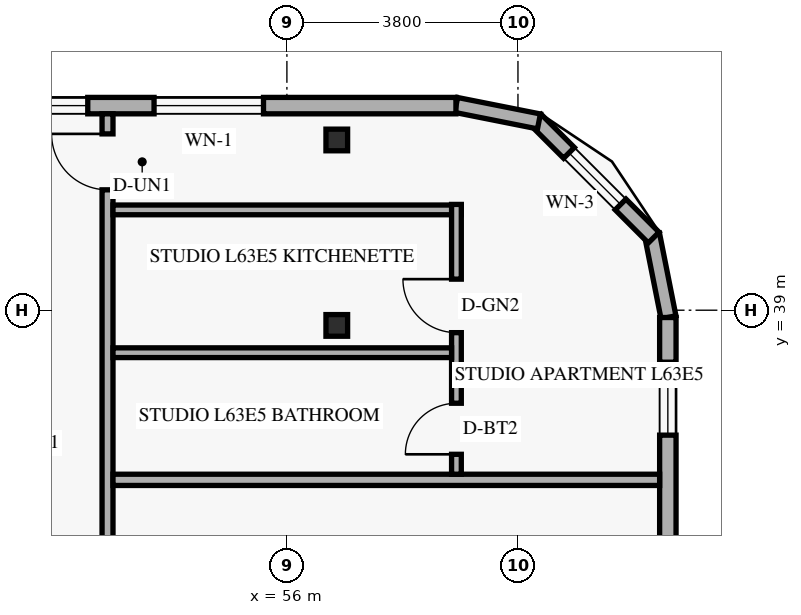
"""IFC4 building model, lengths in metres.
Left out: names, types, materials, properties, quantities, classifications, styles, units other than length and angle.
Written with IfcOpenShell. Run it as: python <this file> out.ifc"""

import sys

from ifc_helpers import new_model, si_unit, direction, frame, frame_2d, origin, origin_2d, place, context, subcontext, project, spatial, rectangle, hollow_rectangle, extrude, element, fill, save


model = new_model("IFC4")
c1 = context("Model", 3, precision=1e-05, world=origin(), true_north=direction((0.0, 1.0)))
c2 = subcontext(c1, "Body", "Model", "MODEL_VIEW")
j1 = project(units=[si_unit("LENGTHUNIT", "METRE"), si_unit("PLANEANGLEUNIT", "RADIAN")], contexts=[c1])
p1 = place(None, origin())
s1 = spatial("IfcSite", under=j1, at=p1, CompositionType="ELEMENT")
p2 = place(p1, origin())
s2 = spatial("IfcBuilding", under=s1, at=p2, CompositionType="ELEMENT")
p3 = place(p2, frame((0.0, 0.0, 242.4)))
s3 = spatial("IfcBuildingStorey", under=s2, at=p3, CompositionType="ELEMENT", Elevation=242.4)
for number, where, z_axis, x_axis in (
    (1, (56.716, 38.75, 0.0), (0.058, 0.0, 0.998), (0.0, 1.0, 0.0)),
    (2, (56.716, 41.8, 0.0), (0.058, 0.0, 0.998), (0.0, 1.0, 0.0)),
):
    element("IfcColumn", number, at=place(p3, frame(where, z_axis=z_axis, x_axis=x_axis)), inside=s3, PredefinedType="COLUMN", context=c2, shape_type="SweptSolid", body=[
        extrude(hollow_rectangle(XDim=0.356, YDim=0.356, WallThickness=0.016, at=origin_2d()), origin(), (0.0, 0.0, 1.0), 3.606),
    ])
p4 = place(p3, frame((62.276, 38.884, 0.0), z_axis=(0.0, 0.0, 1.0), x_axis=(-0.195135625965, 0.9807762678, 0.0)))
e3 = element("IfcWall", 3, at=p4, inside=s3, PredefinedType="SOLIDWALL", context=c2, shape_type="SweptSolid", body=[
    extrude(rectangle(XDim=1.389, YDim=0.25, at=frame_2d((0.694, 0.0))), origin(), (0.0, 0.0, 1.0), 3.36),
])
p5 = place(p3, frame((62.032, 40.195, 0.0), z_axis=(0.0, 0.0, 1.0), x_axis=(-0.707106781187, 0.707106781187, 0.0)))
e4 = element("IfcWall", 4, at=p5, inside=s3, PredefinedType="SOLIDWALL", context=c2, shape_type="SweptSolid", body=[
    extrude(rectangle(XDim=2.739, YDim=0.25, at=frame_2d((1.37, 0.0))), origin(), (0.0, 0.0, 1.0), 3.36),
])
p6 = place(p5, frame((0.77, 0.0, 0.85)))
e5 = element("IfcOpeningElement", 5, at=p6, cuts=e4, PredefinedType="OPENING", context=c2, shape_type="SweptSolid", body=[
    extrude(rectangle(XDim=1.2, YDim=1.5, at=frame_2d((0.6, 0.75))), frame((0.0, 0.135, 0.0), z_axis=(0.0, -1.0, 0.0), x_axis=(1.0, 0.0, 0.0)), (0.0, 0.0, 1.0), 0.27),
])
p7 = place(p3, frame((60.146, 42.105, 0.0), z_axis=(0.0, 0.0, 1.0), x_axis=(-0.980809899341, 0.19496651342, 0.0)))
e6 = element("IfcWall", 6, at=p7, inside=s3, PredefinedType="SOLIDWALL", context=c2, shape_type="SweptSolid", body=[
    extrude(rectangle(XDim=1.389, YDim=0.25, at=frame_2d((0.694, 0.0))), origin(), (0.0, 0.0, 1.0), 3.36),
])
p8 = place(p3, frame((62.265, 9.12, 0.0), z_axis=(0.0, 0.0, 1.0), x_axis=(0.0, 1.0, 0.0)))
e7 = element("IfcWall", 7, at=p8, inside=s3, PredefinedType="SOLIDWALL", context=c2, shape_type="SweptSolid", body=[
    extrude(rectangle(XDim=29.76, YDim=0.27, at=frame_2d((14.88, 0.0))), origin(), (0.0, 0.0, 1.0), 3.36),
])
p9 = place(p8, frame((1.29, 0.0, 0.85)))
e8 = element("IfcOpeningElement", 8, at=p9, cuts=e7, PredefinedType="OPENING", context=c2, shape_type="SweptSolid", body=[
    extrude(rectangle(XDim=1.2, YDim=1.5, at=frame_2d((0.6, 0.75))), frame((0.0, 0.145, 0.0), z_axis=(0.0, -1.0, 0.0), x_axis=(1.0, 0.0, 0.0)), (0.0, 0.0, 1.0), 0.29),
])
p10 = place(p8, frame((7.25, 0.0, 0.85)))
e9 = element("IfcOpeningElement", 9, at=p10, cuts=e7, PredefinedType="OPENING", context=c2, shape_type="SweptSolid", body=[
    extrude(rectangle(XDim=1.2, YDim=1.5, at=frame_2d((0.6, 0.75))), frame((0.0, 0.145, 0.0), z_axis=(0.0, -1.0, 0.0), x_axis=(1.0, 0.0, 0.0)), (0.0, 0.0, 1.0), 0.29),
])
p11 = place(p8, frame((14.245, 0.0, 0.85)))
e10 = element("IfcOpeningElement", 10, at=p11, cuts=e7, PredefinedType="OPENING", context=c2, shape_type="SweptSolid", body=[
    extrude(rectangle(XDim=1.2, YDim=1.5, at=frame_2d((0.6, 0.75))), frame((0.0, 0.145, 0.0), z_axis=(0.0, -1.0, 0.0), x_axis=(1.0, 0.0, 0.0)), (0.0, 0.0, 1.0), 0.29),
])
p12 = place(p8, frame((18.315, 0.0, 0.85)))
e11 = element("IfcOpeningElement", 11, at=p12, cuts=e7, PredefinedType="OPENING", context=c2, shape_type="SweptSolid", body=[
    extrude(rectangle(XDim=1.2, YDim=1.5, at=frame_2d((0.6, 0.75))), frame((0.0, 0.145, 0.0), z_axis=(0.0, -1.0, 0.0), x_axis=(1.0, 0.0, 0.0)), (0.0, 0.0, 1.0), 0.29),
])
p13 = place(p8, frame((22.975, 0.0, 0.85)))
e12 = element("IfcOpeningElement", 12, at=p13, cuts=e7, PredefinedType="OPENING", context=c2, shape_type="SweptSolid", body=[
    extrude(rectangle(XDim=1.2, YDim=1.5, at=frame_2d((0.6, 0.75))), frame((0.0, 0.145, 0.0), z_axis=(0.0, -1.0, 0.0), x_axis=(1.0, 0.0, 0.0)), (0.0, 0.0, 1.0), 0.29),
])
p14 = place(p8, frame((27.825, 0.0, 0.85)))
e13 = element("IfcOpeningElement", 13, at=p14, cuts=e7, PredefinedType="OPENING", context=c2, shape_type="SweptSolid", body=[
    extrude(rectangle(XDim=1.2, YDim=1.5, at=frame_2d((0.6, 0.75))), frame((0.0, 0.145, 0.0), z_axis=(0.0, -1.0, 0.0), x_axis=(1.0, 0.0, 0.0)), (0.0, 0.0, 1.0), 0.29),
])
p15 = place(p3, frame((58.78, 42.365, 0.0), z_axis=(0.0, 0.0, 1.0), x_axis=(-1.0, 0.0, 0.0)))
e14 = element("IfcWall", 14, at=p15, inside=s3, PredefinedType="SOLIDWALL", context=c2, shape_type="SweptSolid", body=[
    extrude(rectangle(XDim=32.96, YDim=0.27, at=frame_2d((16.48, 0.0))), origin(), (0.0, 0.0, 1.0), 3.36),
])
p16 = place(p15, frame((17.735, 0.0, 0.85)))
e15 = element("IfcOpeningElement", 15, at=p16, cuts=e14, PredefinedType="OPENING", context=c2, shape_type="SweptSolid", body=[
    extrude(rectangle(XDim=1.8, YDim=1.6, at=frame_2d((0.9, 0.8))), frame((0.0, 0.145, 0.0), z_axis=(0.0, -1.0, 0.0), x_axis=(1.0, 0.0, 0.0)), (0.0, 0.0, 1.0), 0.29),
])
p17 = place(p15, frame((11.533, 0.0, 0.85)))
e16 = element("IfcOpeningElement", 16, at=p17, cuts=e14, PredefinedType="OPENING", context=c2, shape_type="SweptSolid", body=[
    extrude(rectangle(XDim=1.8, YDim=1.6, at=frame_2d((0.9, 0.8))), frame((0.0, 0.145, 0.0), z_axis=(0.0, -1.0, 0.0), x_axis=(1.0, 0.0, 0.0)), (0.0, 0.0, 1.0), 0.29),
])
p18 = place(p15, frame((6.055, 0.0, 0.85)))
e17 = element("IfcOpeningElement", 17, at=p18, cuts=e14, PredefinedType="OPENING", context=c2, shape_type="SweptSolid", body=[
    extrude(rectangle(XDim=1.2, YDim=1.5, at=frame_2d((0.6, 0.75))), frame((0.0, 0.145, 0.0), z_axis=(0.0, -1.0, 0.0), x_axis=(1.0, 0.0, 0.0)), (0.0, 0.0, 1.0), 0.29),
])
p19 = place(p15, frame((3.165, 0.0, 0.85)))
e18 = element("IfcOpeningElement", 18, at=p19, cuts=e14, PredefinedType="OPENING", context=c2, shape_type="SweptSolid", body=[
    extrude(rectangle(XDim=1.8, YDim=1.6, at=frame_2d((0.9, 0.8))), frame((0.0, 0.145, 0.0), z_axis=(0.0, -1.0, 0.0), x_axis=(1.0, 0.0, 0.0)), (0.0, 0.0, 1.0), 0.29),
])
p20 = place(p3, frame((53.05, 5.77, 0.0), z_axis=(0.0, 0.0, 1.0), x_axis=(0.0, 1.0, 0.0)))
e19 = element("IfcWall", 19, at=p20, inside=s3, PredefinedType="STANDARD", context=c2, shape_type="SweptSolid", body=[
    extrude(rectangle(XDim=36.46, YDim=0.18, at=frame_2d((18.23, 0.0))), origin(), (0.0, 0.0, 1.0), 2.803),
])
p21 = place(p20, frame((1.357, 0.0, 0.0)))
e20 = element("IfcOpeningElement", 20, at=p21, cuts=e19, PredefinedType="OPENING", context=c2, shape_type="SweptSolid", body=[
    extrude(rectangle(XDim=0.92, YDim=2.15, at=frame_2d((0.46, 1.075))), frame((0.0, 0.1, 0.0), z_axis=(0.0, -1.0, 0.0), x_axis=(1.0, 0.0, 0.0)), (0.0, 0.0, 1.0), 0.2),
])
p22 = place(p20, frame((12.03, 0.0, 0.0)))
e21 = element("IfcOpeningElement", 21, at=p22, cuts=e19, PredefinedType="OPENING", context=c2, shape_type="SweptSolid", body=[
    extrude(rectangle(XDim=0.92, YDim=2.15, at=frame_2d((0.46, 1.075))), frame((0.0, 0.1, 0.0), z_axis=(0.0, -1.0, 0.0), x_axis=(1.0, 0.0, 0.0)), (0.0, 0.0, 1.0), 0.2),
])
p23 = place(p20, frame((20.27, 0.0, 0.0)))
e22 = element("IfcOpeningElement", 22, at=p23, cuts=e19, PredefinedType="OPENING", context=c2, shape_type="SweptSolid", body=[
    extrude(rectangle(XDim=0.92, YDim=2.15, at=frame_2d((0.46, 1.075))), frame((0.0, 0.1, 0.0), z_axis=(0.0, -1.0, 0.0), x_axis=(1.0, 0.0, 0.0)), (0.0, 0.0, 1.0), 0.2),
])
p24 = place(p20, frame((28.21, 0.0, 0.0)))
e23 = element("IfcOpeningElement", 23, at=p24, cuts=e19, PredefinedType="OPENING", context=c2, shape_type="SweptSolid", body=[
    extrude(rectangle(XDim=0.92, YDim=2.15, at=frame_2d((0.46, 1.075))), frame((0.0, 0.1, 0.0), z_axis=(0.0, -1.0, 0.0), x_axis=(1.0, 0.0, 0.0)), (0.0, 0.0, 1.0), 0.2),
])
p25 = place(p20, frame((35.21, 0.0, 0.0)))
e24 = element("IfcOpeningElement", 24, at=p25, cuts=e19, PredefinedType="OPENING", context=c2, shape_type="SweptSolid", body=[
    extrude(rectangle(XDim=0.92, YDim=2.15, at=frame_2d((0.46, 1.075))), frame((0.0, 0.1, 0.0), z_axis=(0.0, -1.0, 0.0), x_axis=(1.0, 0.0, 0.0)), (0.0, 0.0, 1.0), 0.2),
])
p26 = place(p3, frame((53.14, 36.21, 0.0), z_axis=(0.0, 0.0, 1.0), x_axis=(1.0, 0.0, 0.0)))
e25 = element("IfcWall", 25, at=p26, inside=s3, PredefinedType="PARTITIONING", context=c2, shape_type="SweptSolid", body=[
    extrude(rectangle(XDim=8.99, YDim=0.185, at=frame_2d((4.495, 0.0))), origin(), (0.0, 0.0, 1.0), 2.879),
])
p27 = place(p3, frame((53.14, 40.65, 0.0), z_axis=(0.0, 0.0, 1.0), x_axis=(1.0, 0.0, 0.0)))
e26 = element("IfcWall", 26, at=p27, inside=s3, PredefinedType="PLUMBINGWALL", context=c2, shape_type="SweptSolid", body=[
    extrude(rectangle(XDim=5.728, YDim=0.16, at=frame_2d((2.864, 0.0))), origin(), (0.0, 0.0, 1.0), 2.879),
])
p28 = place(p3, frame((58.788, 36.302, 0.0), z_axis=(0.0, 0.0, 1.0), x_axis=(0.0, 1.0, 0.0)))
e27 = element("IfcWall", 27, at=p28, inside=s3, PredefinedType="PLUMBINGWALL", context=c2, shape_type="SweptSolid", body=[
    extrude(rectangle(XDim=4.438, YDim=0.16, at=frame_2d((2.219, 0.0))), origin(), (0.0, 0.0, 1.0), 3.36),
])
p29 = place(p28, frame((0.327, 0.0, 0.0)))
e28 = element("IfcOpeningElement", 28, at=p29, cuts=e27, PredefinedType="OPENING", context=c2, shape_type="SweptSolid", body=[
    extrude(rectangle(XDim=0.84, YDim=2.12, at=frame_2d((0.42, 1.06))), frame((0.0, 0.09, 0.0), z_axis=(0.0, -1.0, 0.0), x_axis=(1.0, 0.0, 0.0)), (0.0, 0.0, 1.0), 0.18),
])
p30 = place(p28, frame((2.329, 0.0, 0.0)))
e29 = element("IfcOpeningElement", 29, at=p30, cuts=e27, PredefinedType="OPENING", context=c2, shape_type="SweptSolid", body=[
    extrude(rectangle(XDim=0.88, YDim=2.12, at=frame_2d((0.44, 1.06))), frame((0.0, 0.09, 0.0), z_axis=(0.0, -1.0, 0.0), x_axis=(1.0, 0.0, 0.0)), (0.0, 0.0, 1.0), 0.18),
])
p31 = place(p3, frame((53.14, 38.301, 0.0), z_axis=(0.0, 0.0, 1.0), x_axis=(1.0, 0.0, 0.0)))
e30 = element("IfcWall", 30, at=p31, inside=s3, PredefinedType="PLUMBINGWALL", context=c2, shape_type="SweptSolid", body=[
    extrude(rectangle(XDim=5.568, YDim=0.16, at=frame_2d((2.784, 0.0))), origin(), (0.0, 0.0, 1.0), 2.879),
])
p32 = place(p6, origin())
e31 = element("IfcWindow", 31, at=p32, inside=s3, PartitioningType="SINGLE_PANEL", PredefinedType="WINDOW", context=c2, shape_type="SweptSolid", body=[
    extrude(rectangle(XDim=1.2, YDim=1.5, at=frame_2d((0.6, 0.75))), frame((0.0, 0.03, 0.0), z_axis=(0.0, -1.0, 0.0), x_axis=(1.0, 0.0, 0.0)), (0.0, 0.0, 1.0), 0.06),
])
fill(e5, e31)
p33 = place(p14, origin())
e32 = element("IfcWindow", 32, at=p33, inside=s3, PartitioningType="SINGLE_PANEL", PredefinedType="WINDOW", context=c2, shape_type="SweptSolid", body=[
    extrude(rectangle(XDim=1.2, YDim=1.5, at=frame_2d((0.6, 0.75))), frame((0.0, 0.03, 0.0), z_axis=(0.0, -1.0, 0.0), x_axis=(1.0, 0.0, 0.0)), (0.0, 0.0, 1.0), 0.06),
])
fill(e13, e32)
p34 = place(p18, origin())
e33 = element("IfcWindow", 33, at=p34, inside=s3, PartitioningType="SINGLE_PANEL", PredefinedType="WINDOW", context=c2, shape_type="SweptSolid", body=[
    extrude(rectangle(XDim=1.2, YDim=1.5, at=frame_2d((0.6, 0.75))), frame((0.0, 0.03, 0.0), z_axis=(0.0, -1.0, 0.0), x_axis=(1.0, 0.0, 0.0)), (0.0, 0.0, 1.0), 0.06),
])
fill(e17, e33)
p35 = place(p19, origin())
e34 = element("IfcWindow", 34, at=p35, inside=s3, PartitioningType="SINGLE_PANEL", PredefinedType="WINDOW", context=c2, shape_type="SweptSolid", body=[
    extrude(rectangle(XDim=1.8, YDim=1.6, at=frame_2d((0.9, 0.8))), frame((0.0, 0.03, 0.0), z_axis=(0.0, -1.0, 0.0), x_axis=(1.0, 0.0, 0.0)), (0.0, 0.0, 1.0), 0.06),
])
fill(e18, e34)
p36 = place(p25, origin())
e35 = element("IfcDoor", 35, at=p36, inside=s3, OperationType="SINGLE_SWING_RIGHT", PredefinedType="DOOR", context=c2, shape_type="SweptSolid", body=[
    extrude(rectangle(XDim=0.92, YDim=2.15, at=frame_2d((0.46, 1.075))), frame((0.0, 0.025, 0.0), z_axis=(0.0, -1.0, 0.0), x_axis=(1.0, 0.0, 0.0)), (0.0, 0.0, 1.0), 0.05),
])
fill(e24, e35)
p37 = place(p29, origin())
e36 = element("IfcDoor", 36, at=p37, inside=s3, OperationType="SINGLE_SWING_LEFT", PredefinedType="DOOR", context=c2, shape_type="SweptSolid", body=[
    extrude(rectangle(XDim=0.84, YDim=2.12, at=frame_2d((0.42, 1.06))), frame((0.0, 0.025, 0.0), z_axis=(0.0, -1.0, 0.0), x_axis=(1.0, 0.0, 0.0)), (0.0, 0.0, 1.0), 0.05),
])
fill(e28, e36)
p38 = place(p30, origin())
e37 = element("IfcDoor", 37, at=p38, inside=s3, OperationType="SINGLE_SWING_RIGHT", PredefinedType="DOOR", context=c2, shape_type="SweptSolid", body=[
    extrude(rectangle(XDim=0.88, YDim=2.12, at=frame_2d((0.44, 1.06))), frame((0.0, 0.025, 0.0), z_axis=(0.0, -1.0, 0.0), x_axis=(1.0, 0.0, 0.0)), (0.0, 0.0, 1.0), 0.05),
])
fill(e29, e37)
save(model, sys.argv[1])
